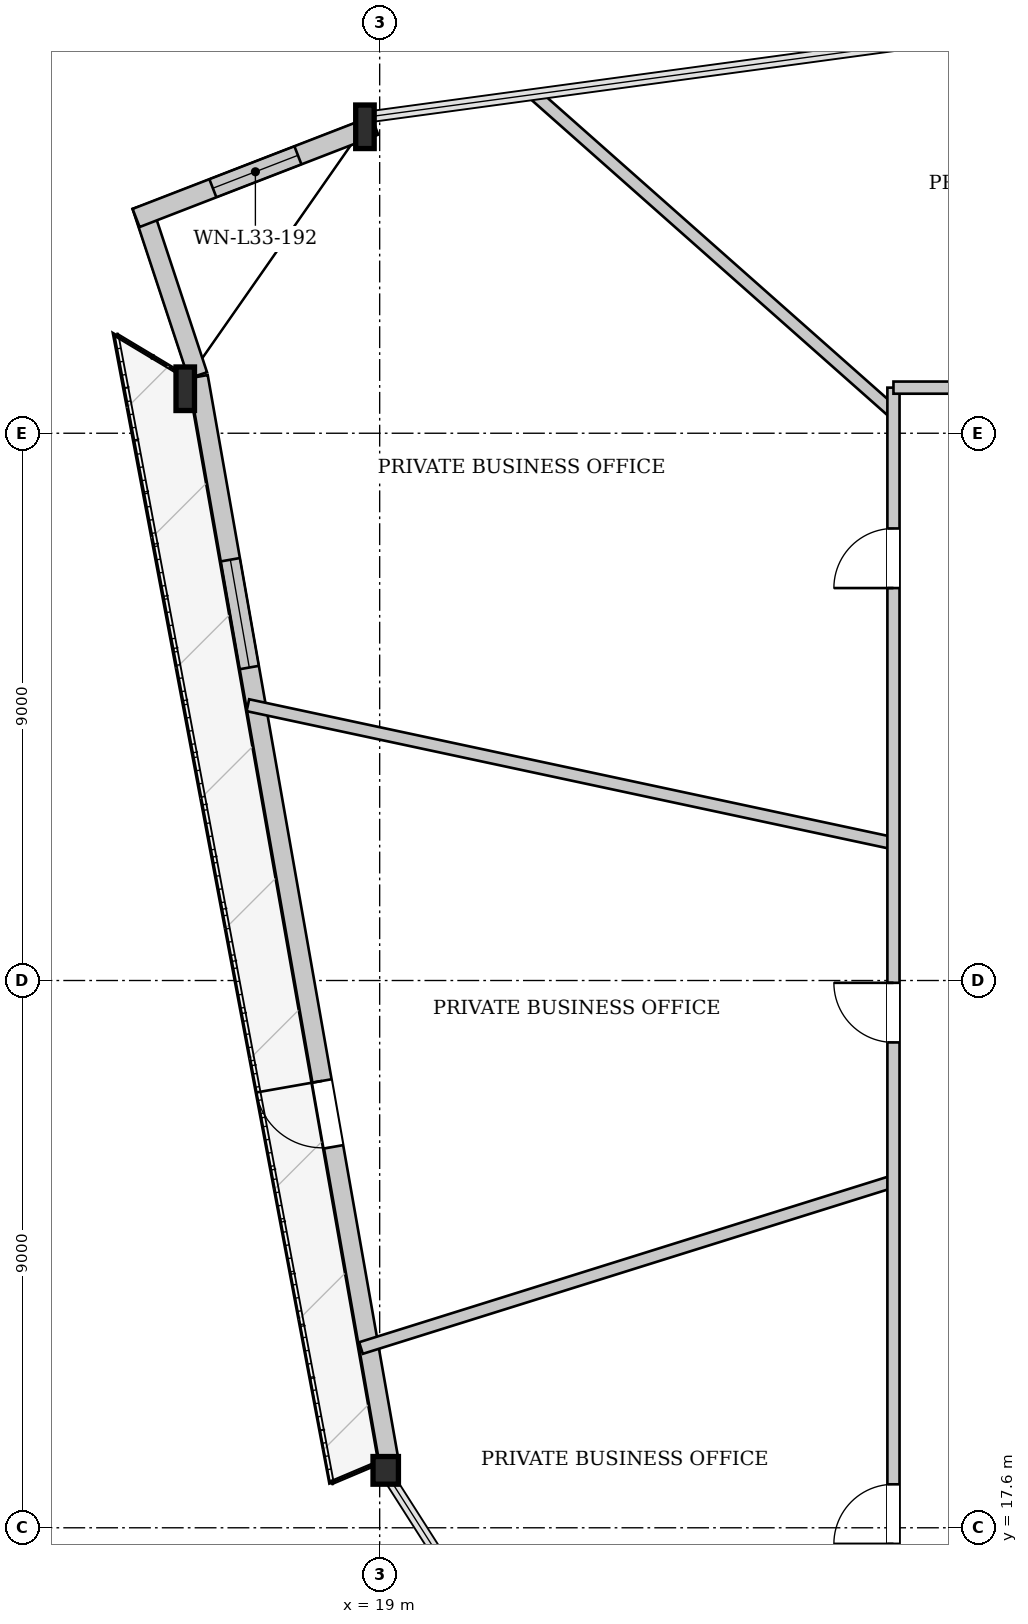
"""IFC4 building model, lengths in metres.
Left out: names, types, materials, properties, quantities, classifications, styles, units other than length and angle.
Written with IfcOpenShell. Run it as: python <this file> out.ifc"""

import sys

from ifc_helpers import new_model, si_unit, direction, frame, frame_2d, origin, origin_2d, place, context, subcontext, project, spatial, rectangle, i_section, extrude, source, transform, mapped, element, fill, save


model = new_model("IFC4")
c1 = context("Model", 3, precision=1e-05, world=origin(), true_north=direction((0.0, 1.0)))
c2 = subcontext(c1, "Body", "Model", "MODEL_VIEW")
j1 = project(units=[si_unit("LENGTHUNIT", "METRE"), si_unit("PLANEANGLEUNIT", "RADIAN")], contexts=[c1])
p1 = place(None, origin())
s1 = spatial("IfcSite", under=j1, at=p1, CompositionType="ELEMENT")
p2 = place(p1, origin())
s2 = spatial("IfcBuilding", under=s1, at=p2, CompositionType="ELEMENT")
p3 = place(p2, frame((0.0, 0.0, 127.0)))
s3 = spatial("IfcBuildingStorey", under=s2, at=p3, CompositionType="ELEMENT", Elevation=127.0)
m1 = source(origin(), c2, "Body", "SweptSolid", [
    extrude(i_section(OverallWidth=0.304, OverallDepth=0.716, WebThickness=0.021, FlangeThickness=0.04, at=origin_2d()), origin(), (0.0, 0.0, 1.0), 3.408),
])
p4 = place(p3, frame((18.861, 40.809, 0.0), z_axis=(-0.060674988564, -0.099143074584, 0.993221625079), x_axis=(0.852946505989, -0.521998331339, 0.0)))
e1 = element("IfcColumn", 1, at=p4, inside=s3, PredefinedType="COLUMN", context=c2, shape_type="MappedRepresentation", body=[
    mapped(m1, transform((0.0, 0.0, 0.0), x_axis=(1.0, 0.0, 0.0), y_axis=(0.0, 1.0, 0.0), z_axis=(0.0, 0.0, 1.0), scale=1.0)),
])
m2 = source(origin(), c2, "Body", "SweptSolid", [
    extrude(i_section(OverallWidth=0.304, OverallDepth=0.716, WebThickness=0.021, FlangeThickness=0.04, at=origin_2d()), origin(), (0.0, 0.0, 1.0), 3.404),
])
p5 = place(p3, frame((15.857, 36.502, 0.0), z_axis=(-0.031917477639, -0.100127637717, 0.994462533626), x_axis=(0.952764304603, -0.30371068449, 0.0)))
e2 = element("IfcColumn", 2, at=p5, inside=s3, PredefinedType="COLUMN", context=c2, shape_type="MappedRepresentation", body=[
    mapped(m2, transform((0.0, 0.0, 0.0), x_axis=(1.0, 0.0, 0.0), y_axis=(0.0, 1.0, 0.0), z_axis=(0.0, 0.0, 1.0), scale=1.0)),
])
m3 = source(origin(), c2, "Body", "SweptSolid", [
    extrude(i_section(OverallWidth=0.418, OverallDepth=0.455, WebThickness=0.038, FlangeThickness=0.059, at=origin_2d()), origin(), (0.0, 0.0, 1.0), 3.402),
])
p6 = place(p3, frame((18.993, 18.675, 0.0), z_axis=(0.06279761444, -0.07672074267, 0.995073056245), x_axis=(0.773828274732, 0.633395454061, 0.0)))
e3 = element("IfcColumn", 3, at=p6, inside=s3, PredefinedType="COLUMN", context=c2, shape_type="MappedRepresentation", body=[
    mapped(m3, transform((0.0, 0.0, 0.0), x_axis=(1.0, 0.0, 0.0), y_axis=(0.0, 1.0, 0.0), z_axis=(0.0, 0.0, 1.0), scale=1.0)),
])
p7 = place(p3, frame((19.15, 18.702, 0.0), z_axis=(0.0, 0.0, 1.0), x_axis=(-0.173250549445, 0.984877782832, 0.0)))
e4 = element("IfcWall", 4, at=p7, inside=s3, PredefinedType="SOLIDWALL", context=c2, shape_type="SweptSolid", body=[
    extrude(rectangle(XDim=18.101, YDim=0.32, at=frame_2d((9.05, 0.0))), origin(), (0.0, 0.0, 1.0), 2.692),
])
p8 = place(p7, frame((5.242, 0.0, 0.0)))
e5 = element("IfcOpeningElement", 5, at=p8, cuts=e4, PredefinedType="OPENING", context=c2, shape_type="SweptSolid", body=[
    extrude(rectangle(XDim=1.1, YDim=2.3, at=frame_2d((0.55, 1.15))), frame((0.0, 0.17, 0.0), z_axis=(0.0, -1.0, 0.0), x_axis=(1.0, 0.0, 0.0)), (0.0, 0.0, 1.0), 0.34),
])
p9 = place(p7, frame((13.245, 0.0, 0.372)))
e6 = element("IfcOpeningElement", 6, at=p9, cuts=e4, PredefinedType="OPENING", context=c2, shape_type="SweptSolid", body=[
    extrude(rectangle(XDim=1.8, YDim=2.2, at=frame_2d((0.9, 1.1))), frame((0.0, 0.17, 0.0), z_axis=(0.0, -1.0, 0.0), x_axis=(1.0, 0.0, 0.0)), (0.0, 0.0, 1.0), 0.34),
])
p10 = place(p3, frame((16.009, 36.552, 0.0), z_axis=(0.0, 0.0, 1.0), x_axis=(-0.313681912959, 0.949528123587, 0.0)))
e7 = element("IfcWall", 7, at=p10, inside=s3, PredefinedType="SOLIDWALL", context=c2, shape_type="SweptSolid", body=[
    extrude(rectangle(XDim=2.936, YDim=0.32, at=frame_2d((1.468, 0.0))), origin(), (0.0, 0.0, 1.0), 2.692),
])
p11 = place(p3, frame((14.994, 39.14, 0.0), z_axis=(0.0, 0.0, 1.0), x_axis=(0.932586996551, 0.360945278212, 0.0)))
e8 = element("IfcWall", 8, at=p11, inside=s3, PredefinedType="SOLIDWALL", context=c2, shape_type="SweptSolid", body=[
    extrude(rectangle(XDim=4.208, YDim=0.32, at=frame_2d((2.104, 0.0))), origin(), (0.0, 0.0, 1.0), 2.692),
])
p12 = place(p11, frame((1.354, 0.0, 0.272)))
e9 = element("IfcOpeningElement", 9, at=p12, cuts=e8, PredefinedType="OPENING", context=c2, shape_type="SweptSolid", body=[
    extrude(rectangle(XDim=1.5, YDim=2.3, at=frame_2d((0.75, 1.15))), frame((0.0, 0.17, 0.0), z_axis=(0.0, -1.0, 0.0), x_axis=(1.0, 0.0, 0.0)), (0.0, 0.0, 1.0), 0.34),
])
p13 = place(p3, frame((27.45, 35.943, 0.0), z_axis=(0.0, 0.0, 1.0), x_axis=(-0.748653900021, 0.662961038059, 0.0)))
e10 = element("IfcWall", 10, at=p13, inside=s3, PredefinedType="PARTITIONING", context=c2, shape_type="SweptSolid", body=[
    extrude(rectangle(XDim=7.849, YDim=0.2, at=frame_2d((3.925, 0.0))), origin(), (0.0, 0.0, 1.0), 3.3),
])
p14 = place(p3, frame((27.45, 28.856, 0.0), z_axis=(0.0, 0.0, 1.0), x_axis=(-0.977884605694, 0.209145159988, 0.0)))
e11 = element("IfcWall", 11, at=p14, inside=s3, PredefinedType="PARTITIONING", context=c2, shape_type="SweptSolid", body=[
    extrude(rectangle(XDim=10.857, YDim=0.2, at=frame_2d((5.429, 0.0))), origin(), (0.0, 0.0, 1.0), 3.3),
])
p15 = place(p3, frame((27.45, 23.298, 0.0), z_axis=(0.0, 0.0, 1.0), x_axis=(-0.954328374734, -0.298759691354, 0.0)))
e12 = element("IfcWall", 12, at=p15, inside=s3, PredefinedType="PARTITIONING", context=c2, shape_type="SweptSolid", body=[
    extrude(rectangle(XDim=9.177, YDim=0.2, at=frame_2d((4.588, 0.0))), origin(), (0.0, 0.0, 1.0), 3.3),
])
p16 = place(p3, frame((27.45, 16.85, 0.0), z_axis=(0.0, 0.0, 1.0), x_axis=(0.0, 1.0, 0.0)))
e13 = element("IfcWall", 13, at=p16, inside=s3, PredefinedType="PARTITIONING", context=c2, shape_type="SweptSolid", body=[
    extrude(rectangle(XDim=19.5, YDim=0.2, at=frame_2d((9.75, 0.0))), origin(), (0.0, 0.0, 1.0), 3.3),
])
p17 = place(p16, frame((16.204, 0.0, 0.0)))
e14 = element("IfcOpeningElement", 14, at=p17, cuts=e13, PredefinedType="OPENING", context=c2, shape_type="SweptSolid", body=[
    extrude(rectangle(XDim=0.98, YDim=2.15, at=frame_2d((0.49, 1.075))), frame((0.0, 0.11, 0.0), z_axis=(0.0, -1.0, 0.0), x_axis=(1.0, 0.0, 0.0)), (0.0, 0.0, 1.0), 0.22),
])
p18 = place(p16, frame((8.732, 0.0, 0.0)))
e15 = element("IfcOpeningElement", 15, at=p18, cuts=e13, PredefinedType="OPENING", context=c2, shape_type="SweptSolid", body=[
    extrude(rectangle(XDim=0.98, YDim=2.15, at=frame_2d((0.49, 1.075))), frame((0.0, 0.11, 0.0), z_axis=(0.0, -1.0, 0.0), x_axis=(1.0, 0.0, 0.0)), (0.0, 0.0, 1.0), 0.22),
])
p19 = place(p16, frame((0.485, 0.0, 0.0)))
e16 = element("IfcOpeningElement", 16, at=p19, cuts=e13, PredefinedType="OPENING", context=c2, shape_type="SweptSolid", body=[
    extrude(rectangle(XDim=0.98, YDim=2.15, at=frame_2d((0.49, 1.075))), frame((0.0, 0.11, 0.0), z_axis=(0.0, -1.0, 0.0), x_axis=(1.0, 0.0, 0.0)), (0.0, 0.0, 1.0), 0.22),
])
p20 = place(p3, frame((27.45, 36.35, 0.0), z_axis=(0.0, 0.0, 1.0), x_axis=(1.0, 0.0, 0.0)))
e17 = element("IfcWall", 17, at=p20, inside=s3, PredefinedType="PARTITIONING", context=c2, shape_type="SweptSolid", body=[
    extrude(rectangle(XDim=21.1, YDim=0.2, at=frame_2d((10.55, 0.0))), origin(), (0.0, 0.0, 1.0), 3.3),
])
p21 = place(p20, frame((19.82, 0.0, 0.0)))
e18 = element("IfcOpeningElement", 18, at=p21, cuts=e17, PredefinedType="OPENING", context=c2, shape_type="SweptSolid", body=[
    extrude(rectangle(XDim=0.98, YDim=2.15, at=frame_2d((0.49, 1.075))), frame((0.0, 0.11, 0.0), z_axis=(0.0, -1.0, 0.0), x_axis=(1.0, 0.0, 0.0)), (0.0, 0.0, 1.0), 0.22),
])
p22 = place(p20, frame((16.504, 0.0, 0.0)))
e19 = element("IfcOpeningElement", 19, at=p22, cuts=e17, PredefinedType="OPENING", context=c2, shape_type="SweptSolid", body=[
    extrude(rectangle(XDim=0.98, YDim=2.15, at=frame_2d((0.49, 1.075))), frame((0.0, 0.11, 0.0), z_axis=(0.0, -1.0, 0.0), x_axis=(1.0, 0.0, 0.0)), (0.0, 0.0, 1.0), 0.22),
])
p23 = place(p20, frame((9.034, 0.0, 0.0)))
e20 = element("IfcOpeningElement", 20, at=p23, cuts=e17, PredefinedType="OPENING", context=c2, shape_type="SweptSolid", body=[
    extrude(rectangle(XDim=0.98, YDim=2.15, at=frame_2d((0.49, 1.075))), frame((0.0, 0.11, 0.0), z_axis=(0.0, -1.0, 0.0), x_axis=(1.0, 0.0, 0.0)), (0.0, 0.0, 1.0), 0.22),
])
p24 = place(p20, frame((1.17, 0.0, 0.0)))
e21 = element("IfcOpeningElement", 21, at=p24, cuts=e17, PredefinedType="OPENING", context=c2, shape_type="SweptSolid", body=[
    extrude(rectangle(XDim=0.98, YDim=2.15, at=frame_2d((0.49, 1.075))), frame((0.0, 0.11, 0.0), z_axis=(0.0, -1.0, 0.0), x_axis=(1.0, 0.0, 0.0)), (0.0, 0.0, 1.0), 0.22),
])
m4 = source(origin(), c2, "Body", "SweptSolid", [
    extrude(rectangle(XDim=1.1, YDim=2.3, at=frame_2d((0.55, 1.15))), frame((0.0, 0.025, 0.0), z_axis=(0.0, -1.0, 0.0), x_axis=(1.0, 0.0, 0.0)), (0.0, 0.0, 1.0), 0.05),
])
p25 = place(p8, origin())
e22 = element("IfcDoor", 22, at=p25, inside=s3, OperationType="SINGLE_SWING_RIGHT", PredefinedType="DOOR", context=c2, shape_type="MappedRepresentation", body=[
    mapped(m4, transform((0.0, 0.0, 0.0), x_axis=(1.0, 0.0, 0.0), y_axis=(0.0, 1.0, 0.0), z_axis=(0.0, 0.0, 1.0), scale=1.0)),
])
fill(e5, e22)
m5 = source(origin(), c2, "Body", "SweptSolid", [
    extrude(rectangle(XDim=1.8, YDim=2.2, at=frame_2d((0.9, 1.1))), frame((0.0, 0.03, 0.0), z_axis=(0.0, -1.0, 0.0), x_axis=(1.0, 0.0, 0.0)), (0.0, 0.0, 1.0), 0.06),
])
p26 = place(p9, origin())
e23 = element("IfcWindow", 23, at=p26, inside=s3, PartitioningType="SINGLE_PANEL", PredefinedType="WINDOW", context=c2, shape_type="MappedRepresentation", body=[
    mapped(m5, transform((0.0, 0.0, 0.0), x_axis=(1.0, 0.0, 0.0), y_axis=(0.0, 1.0, 0.0), z_axis=(0.0, 0.0, 1.0), scale=1.0)),
])
fill(e6, e23)
m6 = source(origin(), c2, "Body", "SweptSolid", [
    extrude(rectangle(XDim=1.5, YDim=2.3, at=frame_2d((0.75, 1.15))), frame((0.0, 0.03, 0.0), z_axis=(0.0, -1.0, 0.0), x_axis=(1.0, 0.0, 0.0)), (0.0, 0.0, 1.0), 0.06),
])
p27 = place(p12, origin())
e24 = element("IfcWindow", 24, at=p27, inside=s3, PartitioningType="SINGLE_PANEL", PredefinedType="WINDOW", context=c2, shape_type="MappedRepresentation", body=[
    mapped(m6, transform((0.0, 0.0, 0.0), x_axis=(1.0, 0.0, 0.0), y_axis=(0.0, 1.0, 0.0), z_axis=(0.0, 0.0, 1.0), scale=1.0)),
])
fill(e9, e24)
m7 = source(origin(), c2, "Body", "SweptSolid", [
    extrude(rectangle(XDim=0.98, YDim=2.15, at=frame_2d((0.49, 1.075))), frame((0.0, 0.025, 0.0), z_axis=(0.0, -1.0, 0.0), x_axis=(1.0, 0.0, 0.0)), (0.0, 0.0, 1.0), 0.05),
])
p28 = place(p17, origin())
e25 = element("IfcDoor", 25, at=p28, inside=s3, OperationType="SINGLE_SWING_LEFT", PredefinedType="DOOR", context=c2, shape_type="MappedRepresentation", body=[
    mapped(m7, transform((0.0, 0.0, 0.0), x_axis=(1.0, 0.0, 0.0), y_axis=(0.0, 1.0, 0.0), z_axis=(0.0, 0.0, 1.0), scale=1.0)),
])
fill(e14, e25)
p29 = place(p18, origin())
e26 = element("IfcDoor", 26, at=p29, inside=s3, OperationType="SINGLE_SWING_RIGHT", PredefinedType="DOOR", context=c2, shape_type="MappedRepresentation", body=[
    mapped(m7, transform((0.0, 0.0, 0.0), x_axis=(1.0, 0.0, 0.0), y_axis=(0.0, 1.0, 0.0), z_axis=(0.0, 0.0, 1.0), scale=1.0)),
])
fill(e15, e26)
p30 = place(p19, origin())
e27 = element("IfcDoor", 27, at=p30, inside=s3, OperationType="SINGLE_SWING_LEFT", PredefinedType="DOOR", context=c2, shape_type="MappedRepresentation", body=[
    mapped(m7, transform((0.0, 0.0, 0.0), x_axis=(1.0, 0.0, 0.0), y_axis=(0.0, 1.0, 0.0), z_axis=(0.0, 0.0, 1.0), scale=1.0)),
])
fill(e16, e27)
save(model, sys.argv[1])
